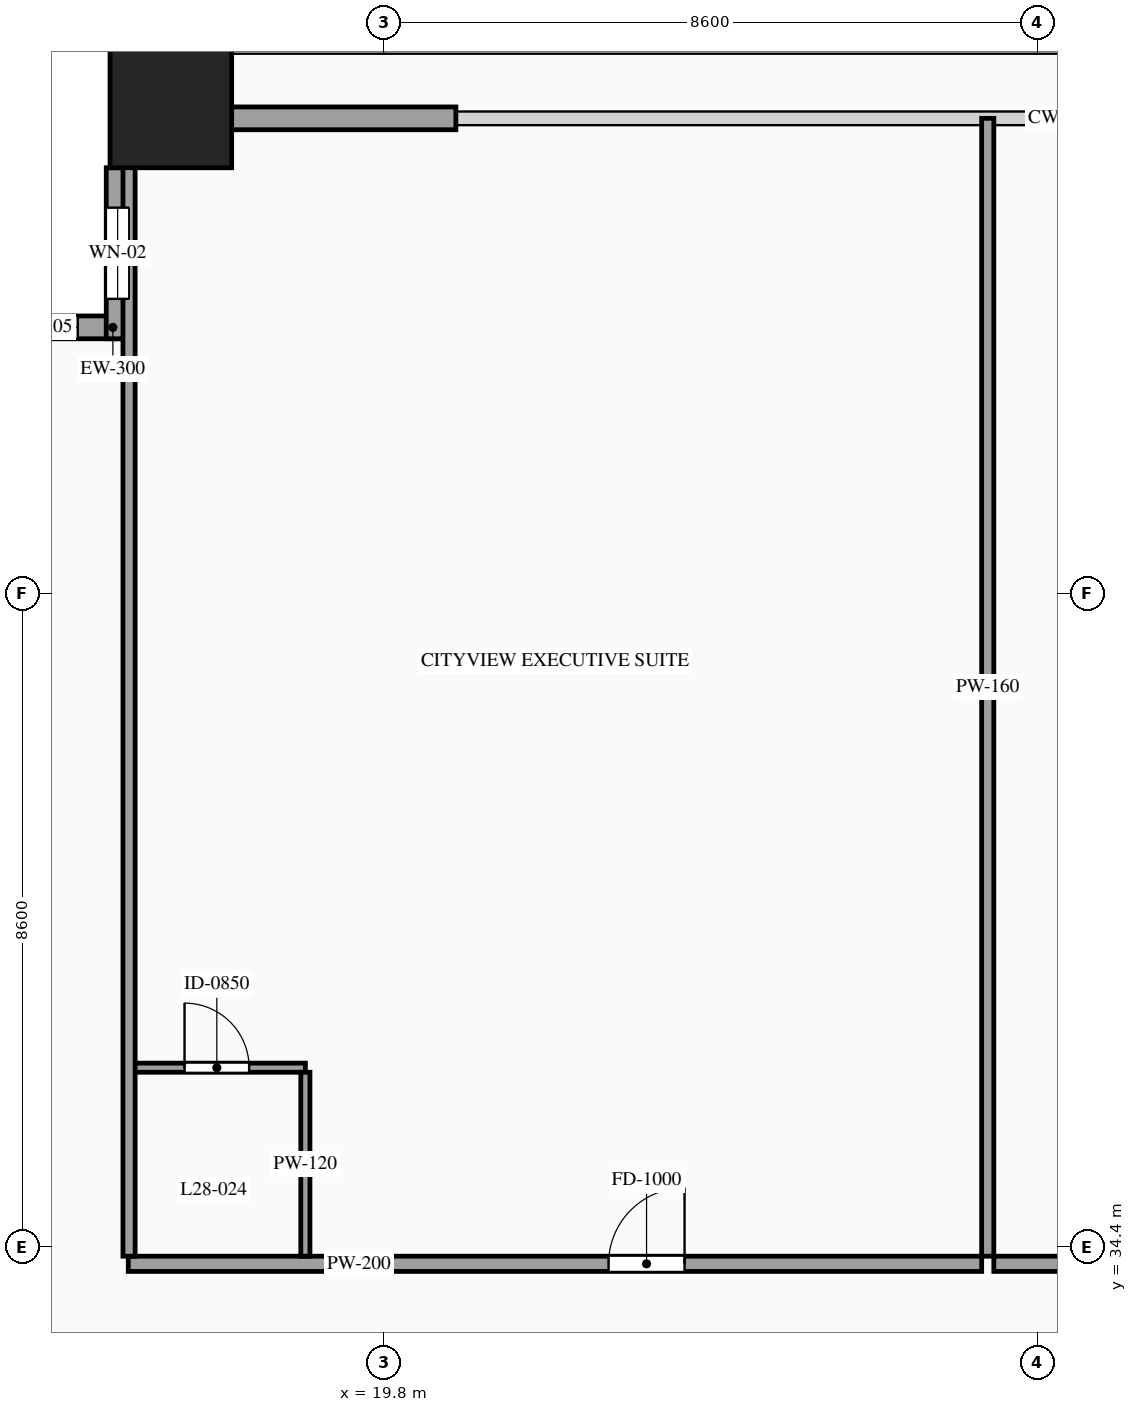
"""IFC4 building model, lengths in metres.
Left out: names, types, materials, properties, quantities, classifications, styles, units other than length and angle.
Written with IfcOpenShell. Run it as: python <this file> out.ifc"""

import sys

from ifc_helpers import new_model, si_unit, direction, frame, frame_2d, origin, origin_2d, place, context, subcontext, project, spatial, rectangle, hollow_rectangle, extrude, source, transform, mapped, element, fill, save


model = new_model("IFC4")
c1 = context("Model", 3, precision=1e-05, world=origin(), true_north=direction((0.0, 1.0)))
c2 = subcontext(c1, "Body", "Model", "MODEL_VIEW")
j1 = project(units=[si_unit("LENGTHUNIT", "METRE"), si_unit("PLANEANGLEUNIT", "RADIAN")], contexts=[c1])
p1 = place(None, origin())
s1 = spatial("IfcSite", under=j1, at=p1, CompositionType="ELEMENT")
p2 = place(p1, origin())
s2 = spatial("IfcBuilding", under=s1, at=p2, CompositionType="ELEMENT")
p3 = place(p2, frame((0.0, 0.0, 108.2)))
s3 = spatial("IfcBuildingStorey", under=s2, at=p3, CompositionType="ELEMENT", Elevation=108.2)
m1 = source(origin(), c2, "Body", "SweptSolid", [
    extrude(hollow_rectangle(XDim=1.6, YDim=1.6, WallThickness=0.07, at=origin_2d()), origin(), (0.0, 0.0, 1.0), 3.6),
])
p4 = place(p3, frame((17.0, 49.4, 0.0), z_axis=(0.0, 0.0, 1.0), x_axis=(1.0, 0.0, 0.0)))
e1 = element("IfcColumn", 1, at=p4, inside=s3, PredefinedType="COLUMN", context=c2, shape_type="MappedRepresentation", body=[
    mapped(m1, transform((0.0, 0.0, 0.0), scale=1.0)),
])
p5 = place(p3, frame((16.45, 46.5, 0.0), z_axis=(0.0, 0.0, 1.0), x_axis=(-1.0, 0.0, 0.0)))
e2 = element("IfcWall", 2, at=p5, inside=s3, PredefinedType="SOLIDWALL", context=c2, shape_type="SweptSolid", body=[
    extrude(rectangle(XDim=2.25, YDim=0.3, at=frame_2d((1.125, 0.0))), origin(), (0.0, 0.0, 1.0), 3.38),
])
p6 = place(p5, frame((0.675, 0.0, 0.85)))
e3 = element("IfcOpeningElement", 3, at=p6, cuts=e2, PredefinedType="OPENING", context=c2, shape_type="SweptSolid", body=[
    extrude(rectangle(XDim=0.9, YDim=1.5, at=frame_2d((0.45, 0.75))), frame((0.0, 0.165, 0.0), z_axis=(0.0, -1.0, 0.0), x_axis=(1.0, 0.0, 0.0)), (0.0, 0.0, 1.0), 0.33),
])
p7 = place(p3, frame((16.3, 48.6, 0.0), z_axis=(0.0, 0.0, 1.0), x_axis=(0.0, -1.0, 0.0)))
e4 = element("IfcWall", 4, at=p7, inside=s3, PredefinedType="SOLIDWALL", context=c2, shape_type="SweptSolid", body=[
    extrude(rectangle(XDim=2.25, YDim=0.3, at=frame_2d((1.125, 0.0))), origin(), (0.0, 0.0, 1.0), 3.38),
])
p8 = place(p7, frame((0.525, 0.0, 0.85)))
e5 = element("IfcOpeningElement", 5, at=p8, cuts=e4, PredefinedType="OPENING", context=c2, shape_type="SweptSolid", body=[
    extrude(rectangle(XDim=1.2, YDim=2.1, at=frame_2d((0.6, 1.05))), frame((0.0, 0.165, 0.0), z_axis=(0.0, -1.0, 0.0), x_axis=(1.0, 0.0, 0.0)), (0.0, 0.0, 1.0), 0.33),
])
m2 = source(origin(), c2, "Body", "SweptSolid", [
    extrude(rectangle(XDim=2.95, YDim=0.3, at=frame_2d((1.475, 0.0))), origin(), (0.0, 0.0, 1.0), 2.775),
])
p9 = place(p3, frame((17.8, 49.25, 0.0), z_axis=(0.0, 0.0, 1.0), x_axis=(1.0, 0.0, 0.0)))
e6 = element("IfcWall", 6, at=p9, inside=s3, PredefinedType="SOLIDWALL", context=c2, shape_type="MappedRepresentation", body=[
    mapped(m2, transform((0.0, 0.0, 0.0), scale=1.0)),
])
p10 = place(p3, frame((16.44, 34.18, 0.0), z_axis=(0.0, 0.0, 1.0), x_axis=(1.0, 0.0, 0.0)))
e7 = element("IfcWall", 7, at=p10, inside=s3, PredefinedType="PARTITIONING", context=c2, shape_type="SweptSolid", body=[
    extrude(rectangle(XDim=11.228, YDim=0.2, at=frame_2d((5.614, 0.0))), origin(), (0.0, 0.0, 1.0), 3.38),
])
p11 = place(p10, frame((6.319, 0.0, 0.0)))
e8 = element("IfcOpeningElement", 8, at=p11, cuts=e7, PredefinedType="OPENING", context=c2, shape_type="SweptSolid", body=[
    extrude(rectangle(XDim=1.0, YDim=2.2, at=frame_2d((0.5, 1.1))), frame((0.0, 0.115, 0.0), z_axis=(0.0, -1.0, 0.0), x_axis=(1.0, 0.0, 0.0)), (0.0, 0.0, 1.0), 0.23),
])
m3 = source(origin(), c2, "Body", "SweptSolid", [
    extrude(rectangle(XDim=14.97, YDim=0.16, at=frame_2d((7.485, 0.0))), origin(), (0.0, 0.0, 1.0), 3.38),
])
p12 = place(p3, frame((27.748, 34.28, 0.0), z_axis=(0.0, 0.0, 1.0), x_axis=(0.0, 1.0, 0.0)))
e9 = element("IfcWall", 9, at=p12, inside=s3, PredefinedType="PARTITIONING", context=c2, shape_type="MappedRepresentation", body=[
    mapped(m3, transform((0.0, 0.0, 0.0), scale=1.0)),
])
p13 = place(p3, frame((16.44, 36.76, 0.0), z_axis=(0.0, 0.0, 1.0), x_axis=(1.0, 0.0, 0.0)))
e10 = element("IfcWall", 10, at=p13, inside=s3, PredefinedType="PARTITIONING", context=c2, shape_type="SweptSolid", body=[
    extrude(rectangle(XDim=2.33, YDim=0.12, at=frame_2d((1.165, 0.0))), origin(), (0.0, 0.0, 1.0), 3.38),
])
p14 = place(p13, frame((0.74, 0.0, 0.0)))
e11 = element("IfcOpeningElement", 11, at=p14, cuts=e10, PredefinedType="OPENING", context=c2, shape_type="SweptSolid", body=[
    extrude(rectangle(XDim=0.85, YDim=2.1, at=frame_2d((0.425, 1.05))), frame((0.0, 0.075, 0.0), z_axis=(0.0, -1.0, 0.0), x_axis=(1.0, 0.0, 0.0)), (0.0, 0.0, 1.0), 0.15),
])
m4 = source(origin(), c2, "Body", "SweptSolid", [
    extrude(rectangle(XDim=2.42, YDim=0.12, at=frame_2d((1.21, 0.0))), origin(), (0.0, 0.0, 1.0), 3.38),
])
p15 = place(p3, frame((18.77, 34.28, 0.0), z_axis=(0.0, 0.0, 1.0), x_axis=(0.0, 1.0, 0.0)))
e12 = element("IfcWall", 12, at=p15, inside=s3, PredefinedType="PARTITIONING", context=c2, shape_type="MappedRepresentation", body=[
    mapped(m4, transform((0.0, 0.0, 0.0), scale=1.0)),
])
p16 = place(p3, frame((27.828, 34.18, 0.0), z_axis=(0.0, 0.0, 1.0), x_axis=(1.0, 0.0, 0.0)))
e13 = element("IfcWall", 13, at=p16, inside=s3, PredefinedType="PARTITIONING", context=c2, shape_type="SweptSolid", body=[
    extrude(rectangle(XDim=9.092, YDim=0.2, at=frame_2d((4.546, 0.0))), origin(), (0.0, 0.0, 1.0), 3.38),
])
p17 = place(p16, frame((4.046, 0.0, 0.0)))
e14 = element("IfcOpeningElement", 14, at=p17, cuts=e13, PredefinedType="OPENING", context=c2, shape_type="SweptSolid", body=[
    extrude(rectangle(XDim=1.0, YDim=2.2, at=frame_2d((0.5, 1.1))), frame((0.0, 0.115, 0.0), z_axis=(0.0, -1.0, 0.0), x_axis=(1.0, 0.0, 0.0)), (0.0, 0.0, 1.0), 0.23),
])
m5 = source(origin(), c2, "Body", "SweptSolid", [
    extrude(rectangle(XDim=14.82, YDim=0.16, at=frame_2d((7.41, 0.0))), origin(), (0.0, 0.0, 1.0), 3.38),
])
p18 = place(p3, frame((16.45, 34.28, 0.0), z_axis=(0.0, 0.0, 1.0), x_axis=(0.0, 1.0, 0.0)))
e15 = element("IfcWall", 15, at=p18, inside=s3, PredefinedType="PARTITIONING", context=c2, shape_type="MappedRepresentation", body=[
    mapped(m5, transform((0.0, 0.0, 0.0), scale=1.0)),
])
m6 = source(origin(), c2, "Body", "SweptSolid", [
    extrude(rectangle(XDim=0.9, YDim=1.5, at=frame_2d((0.45, 0.75))), frame((0.0, 0.03, 0.0), z_axis=(0.0, -1.0, 0.0), x_axis=(1.0, 0.0, 0.0)), (0.0, 0.0, 1.0), 0.06),
])
p19 = place(p6, origin())
e16 = element("IfcWindow", 16, at=p19, inside=s3, PartitioningType="SINGLE_PANEL", PredefinedType="WINDOW", context=c2, shape_type="MappedRepresentation", body=[
    mapped(m6, transform((0.0, 0.0, 0.0), scale=1.0)),
])
fill(e3, e16)
m7 = source(origin(), c2, "Body", "SweptSolid", [
    extrude(rectangle(XDim=1.2, YDim=2.1, at=frame_2d((0.6, 1.05))), frame((0.0, 0.03, 0.0), z_axis=(0.0, -1.0, 0.0), x_axis=(1.0, 0.0, 0.0)), (0.0, 0.0, 1.0), 0.06),
])
p20 = place(p8, origin())
e17 = element("IfcWindow", 17, at=p20, inside=s3, PartitioningType="SINGLE_PANEL", PredefinedType="WINDOW", context=c2, shape_type="MappedRepresentation", body=[
    mapped(m7, transform((0.0, 0.0, 0.0), scale=1.0)),
])
fill(e5, e17)
m8 = source(origin(), c2, "Body", "SweptSolid", [
    extrude(rectangle(XDim=1.0, YDim=2.2, at=frame_2d((0.5, 1.1))), frame((0.0, 0.025, 0.0), z_axis=(0.0, -1.0, 0.0), x_axis=(1.0, 0.0, 0.0)), (0.0, 0.0, 1.0), 0.05),
])
p21 = place(p11, origin())
e18 = element("IfcDoor", 18, at=p21, inside=s3, OperationType="SINGLE_SWING_RIGHT", PredefinedType="DOOR", context=c2, shape_type="MappedRepresentation", body=[
    mapped(m8, transform((0.0, 0.0, 0.0), scale=1.0)),
])
fill(e8, e18)
m9 = source(origin(), c2, "Body", "SweptSolid", [
    extrude(rectangle(XDim=0.85, YDim=2.1, at=frame_2d((0.425, 1.05))), frame((0.0, 0.025, 0.0), z_axis=(0.0, -1.0, 0.0), x_axis=(1.0, 0.0, 0.0)), (0.0, 0.0, 1.0), 0.05),
])
p22 = place(p14, origin())
e19 = element("IfcDoor", 19, at=p22, inside=s3, OperationType="SINGLE_SWING_LEFT", PredefinedType="DOOR", context=c2, shape_type="MappedRepresentation", body=[
    mapped(m9, transform((0.0, 0.0, 0.0), scale=1.0)),
])
fill(e11, e19)
save(model, sys.argv[1])
